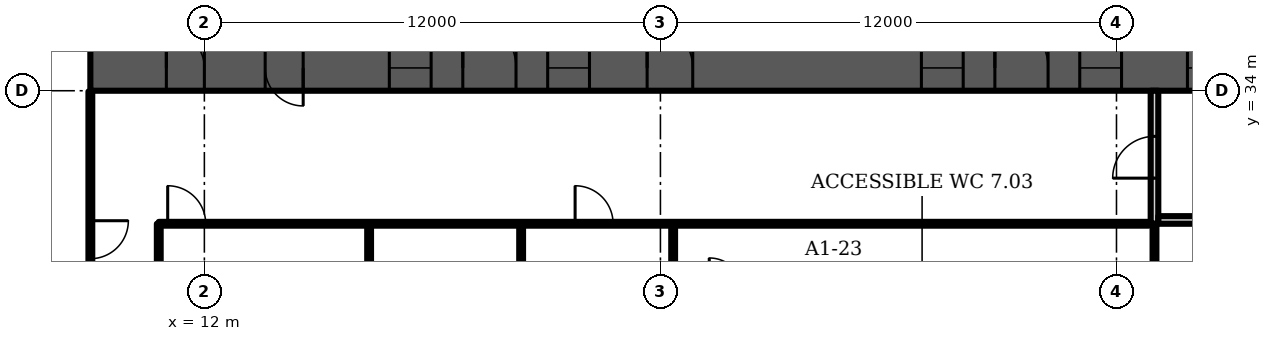
"""IFC4 building model, lengths in metres.
Left out: names, types, materials, properties, quantities, classifications, styles, units other than length and angle.
Written with IfcOpenShell. Run it as: python <this file> out.ifc"""

import sys

from ifc_helpers import new_model, si_unit, direction, frame, frame_2d, origin, place, context, subcontext, project, spatial, rectangle, extrude, element, fill, save


model = new_model("IFC4")
c1 = context("Model", 3, precision=1e-05, world=origin(), true_north=direction((0.0, 1.0)))
c2 = subcontext(c1, "Body", "Model", "MODEL_VIEW")
j1 = project(units=[si_unit("LENGTHUNIT", "METRE"), si_unit("PLANEANGLEUNIT", "RADIAN")], contexts=[c1])
p1 = place(None, origin())
s1 = spatial("IfcSite", under=j1, at=p1, CompositionType="ELEMENT")
p2 = place(p1, origin())
s2 = spatial("IfcBuilding", under=s1, at=p2, CompositionType="ELEMENT")
p3 = place(p2, frame((0.0, 0.0, 45.1)))
s3 = spatial("IfcBuildingStorey", under=s2, at=p3, CompositionType="ELEMENT", Elevation=45.1)
p4 = place(p3, frame((9.0, 34.6, 0.0), z_axis=(0.0, 0.0, 1.0), x_axis=(1.0, 0.0, 0.0)))
e1 = element("IfcWall", 1, at=p4, inside=s3, PredefinedType="SHEAR", context=c2, shape_type="SweptSolid", body=[
    extrude(rectangle(XDim=56.0, YDim=1.2, at=frame_2d((28.0, 0.0))), origin(), (0.0, 0.0, 1.0), 3.6),
])
p5 = place(p4, frame((2.0, 0.0, 0.0)))
e2 = element("IfcOpeningElement", 2, at=p5, cuts=e1, PredefinedType="OPENING", context=c2, shape_type="SweptSolid", body=[
    extrude(rectangle(XDim=1.0, YDim=2.1, at=frame_2d((0.5, 1.05))), frame((0.0, 0.61, 0.0), z_axis=(0.0, -1.0, 0.0), x_axis=(1.0, 0.0, 0.0)), (0.0, 0.0, 1.0), 1.22),
])
p6 = place(p4, frame((4.6, 0.0, 0.0)))
e3 = element("IfcOpeningElement", 3, at=p6, cuts=e1, PredefinedType="OPENING", context=c2, shape_type="SweptSolid", body=[
    extrude(rectangle(XDim=1.0, YDim=2.1, at=frame_2d((0.5, 1.05))), frame((0.0, 0.61, 0.0), z_axis=(0.0, -1.0, 0.0), x_axis=(1.0, 0.0, 0.0)), (0.0, 0.0, 1.0), 1.22),
])
p7 = place(p4, frame((7.867, 0.0, 0.0)))
e4 = element("IfcOpeningElement", 4, at=p7, cuts=e1, PredefinedType="OPENING", context=c2, shape_type="SweptSolid", body=[
    extrude(rectangle(XDim=1.1, YDim=2.1, at=frame_2d((0.55, 1.05))), frame((0.0, 0.61, 0.0), z_axis=(0.0, -1.0, 0.0), x_axis=(1.0, 0.0, 0.0)), (0.0, 0.0, 1.0), 1.22),
])
p8 = place(p4, frame((12.033, 0.0, 0.0)))
e5 = element("IfcOpeningElement", 5, at=p8, cuts=e1, PredefinedType="OPENING", context=c2, shape_type="SweptSolid", body=[
    extrude(rectangle(XDim=1.1, YDim=2.1, at=frame_2d((0.55, 1.05))), frame((0.0, 0.61, 0.0), z_axis=(0.0, -1.0, 0.0), x_axis=(1.0, 0.0, 0.0)), (0.0, 0.0, 1.0), 1.22),
])
p9 = place(p4, frame((9.8, 0.0, 0.0)))
e6 = element("IfcOpeningElement", 6, at=p9, cuts=e1, PredefinedType="OPENING", context=c2, shape_type="SweptSolid", body=[
    extrude(rectangle(XDim=1.4, YDim=2.1, at=frame_2d((0.7, 1.05))), frame((0.0, 0.61, 0.0), z_axis=(0.0, -1.0, 0.0), x_axis=(1.0, 0.0, 0.0)), (0.0, 0.0, 1.0), 1.22),
])
p10 = place(p4, frame((14.65, 0.0, 0.0)))
e7 = element("IfcOpeningElement", 7, at=p10, cuts=e1, PredefinedType="OPENING", context=c2, shape_type="SweptSolid", body=[
    extrude(rectangle(XDim=1.2, YDim=2.1, at=frame_2d((0.6, 1.05))), frame((0.0, 0.61, 0.0), z_axis=(0.0, -1.0, 0.0), x_axis=(1.0, 0.0, 0.0)), (0.0, 0.0, 1.0), 1.22),
])
p11 = place(p4, frame((21.867, 0.0, 0.0)))
e8 = element("IfcOpeningElement", 8, at=p11, cuts=e1, PredefinedType="OPENING", context=c2, shape_type="SweptSolid", body=[
    extrude(rectangle(XDim=1.1, YDim=2.1, at=frame_2d((0.55, 1.05))), frame((0.0, 0.61, 0.0), z_axis=(0.0, -1.0, 0.0), x_axis=(1.0, 0.0, 0.0)), (0.0, 0.0, 1.0), 1.22),
])
p12 = place(p4, frame((26.033, 0.0, 0.0)))
e9 = element("IfcOpeningElement", 9, at=p12, cuts=e1, PredefinedType="OPENING", context=c2, shape_type="SweptSolid", body=[
    extrude(rectangle(XDim=1.1, YDim=2.1, at=frame_2d((0.55, 1.05))), frame((0.0, 0.61, 0.0), z_axis=(0.0, -1.0, 0.0), x_axis=(1.0, 0.0, 0.0)), (0.0, 0.0, 1.0), 1.22),
])
p13 = place(p4, frame((23.8, 0.0, 0.0)))
e10 = element("IfcOpeningElement", 10, at=p13, cuts=e1, PredefinedType="OPENING", context=c2, shape_type="SweptSolid", body=[
    extrude(rectangle(XDim=1.4, YDim=2.1, at=frame_2d((0.7, 1.05))), frame((0.0, 0.61, 0.0), z_axis=(0.0, -1.0, 0.0), x_axis=(1.0, 0.0, 0.0)), (0.0, 0.0, 1.0), 1.22),
])
p14 = place(p4, frame((28.867, 0.0, 0.0)))
e11 = element("IfcOpeningElement", 11, at=p14, cuts=e1, PredefinedType="OPENING", context=c2, shape_type="SweptSolid", body=[
    extrude(rectangle(XDim=1.1, YDim=2.1, at=frame_2d((0.55, 1.05))), frame((0.0, 0.61, 0.0), z_axis=(0.0, -1.0, 0.0), x_axis=(1.0, 0.0, 0.0)), (0.0, 0.0, 1.0), 1.22),
])
p15 = place(p4, frame((33.033, 0.0, 0.0)))
e12 = element("IfcOpeningElement", 12, at=p15, cuts=e1, PredefinedType="OPENING", context=c2, shape_type="SweptSolid", body=[
    extrude(rectangle(XDim=1.1, YDim=2.1, at=frame_2d((0.55, 1.05))), frame((0.0, 0.61, 0.0), z_axis=(0.0, -1.0, 0.0), x_axis=(1.0, 0.0, 0.0)), (0.0, 0.0, 1.0), 1.22),
])
p16 = place(p4, frame((40.15, 0.0, 0.0)))
e13 = element("IfcOpeningElement", 13, at=p16, cuts=e1, PredefinedType="OPENING", context=c2, shape_type="SweptSolid", body=[
    extrude(rectangle(XDim=1.2, YDim=2.1, at=frame_2d((0.6, 1.05))), frame((0.0, 0.61, 0.0), z_axis=(0.0, -1.0, 0.0), x_axis=(1.0, 0.0, 0.0)), (0.0, 0.0, 1.0), 1.22),
])
p17 = place(p4, frame((44.8, 0.0, 0.0)))
e14 = element("IfcOpeningElement", 14, at=p17, cuts=e1, PredefinedType="OPENING", context=c2, shape_type="SweptSolid", body=[
    extrude(rectangle(XDim=1.4, YDim=2.1, at=frame_2d((0.7, 1.05))), frame((0.0, 0.61, 0.0), z_axis=(0.0, -1.0, 0.0), x_axis=(1.0, 0.0, 0.0)), (0.0, 0.0, 1.0), 1.22),
])
p18 = place(p4, frame((49.867, 0.0, 0.0)))
e15 = element("IfcOpeningElement", 15, at=p18, cuts=e1, PredefinedType="OPENING", context=c2, shape_type="SweptSolid", body=[
    extrude(rectangle(XDim=1.1, YDim=2.1, at=frame_2d((0.55, 1.05))), frame((0.0, 0.61, 0.0), z_axis=(0.0, -1.0, 0.0), x_axis=(1.0, 0.0, 0.0)), (0.0, 0.0, 1.0), 1.22),
])
p19 = place(p4, frame((53.5, 0.0, 0.0)))
e16 = element("IfcOpeningElement", 16, at=p19, cuts=e1, PredefinedType="OPENING", context=c2, shape_type="SweptSolid", body=[
    extrude(rectangle(XDim=1.1, YDim=2.1, at=frame_2d((0.55, 1.05))), frame((0.0, 0.61, 0.0), z_axis=(0.0, -1.0, 0.0), x_axis=(1.0, 0.0, 0.0)), (0.0, 0.0, 1.0), 1.22),
])
p20 = place(p4, frame((51.567, 0.0, 0.0)))
e17 = element("IfcOpeningElement", 17, at=p20, cuts=e1, PredefinedType="OPENING", context=c2, shape_type="SweptSolid", body=[
    extrude(rectangle(XDim=1.4, YDim=2.1, at=frame_2d((0.7, 1.05))), frame((0.0, 0.61, 0.0), z_axis=(0.0, -1.0, 0.0), x_axis=(1.0, 0.0, 0.0)), (0.0, 0.0, 1.0), 1.22),
])
p21 = place(p3, frame((37.0, 30.5, 0.0), z_axis=(0.0, 0.0, 1.0), x_axis=(0.0, 1.0, 0.0)))
e18 = element("IfcWall", 18, at=p21, inside=s3, PredefinedType="PARTITIONING", context=c2, shape_type="SweptSolid", body=[
    extrude(rectangle(XDim=3.5, YDim=0.2, at=frame_2d((1.75, 0.0))), origin(), (0.0, 0.0, 1.0), 3.2),
])
p22 = place(p21, frame((1.2, 0.0, 0.0)))
e19 = element("IfcOpeningElement", 19, at=p22, cuts=e18, PredefinedType="OPENING", context=c2, shape_type="SweptSolid", body=[
    extrude(rectangle(XDim=1.1, YDim=2.1, at=frame_2d((0.55, 1.05))), frame((0.0, 0.11, 0.0), z_axis=(0.0, -1.0, 0.0), x_axis=(1.0, 0.0, 0.0)), (0.0, 0.0, 1.0), 0.22),
])
p23 = place(p3, frame((37.1, 30.6, 0.0), z_axis=(0.0, 0.0, 1.0), x_axis=(1.0, 0.0, 0.0)))
e20 = element("IfcWall", 20, at=p23, inside=s3, PredefinedType="PARTITIONING", context=c2, shape_type="SweptSolid", body=[
    extrude(rectangle(XDim=2.8, YDim=0.2, at=frame_2d((1.4, 0.0))), origin(), (0.0, 0.0, 1.0), 3.2),
])
p24 = place(p3, frame((9.0, 26.02, 0.0), z_axis=(0.0, 0.0, 1.0), x_axis=(0.0, 1.0, 0.0)))
e21 = element("IfcWall", 21, at=p24, inside=s3, PredefinedType="PARTITIONING", context=c2, shape_type="SweptSolid", body=[
    extrude(rectangle(XDim=7.96, YDim=0.1, at=frame_2d((3.98, 0.0))), origin(), (0.0, 0.0, 1.0), 3.2),
])
p25 = place(p24, frame((3.56, 0.0, 0.0)))
e22 = element("IfcOpeningElement", 22, at=p25, cuts=e21, PredefinedType="OPENING", context=c2, shape_type="SweptSolid", body=[
    extrude(rectangle(XDim=1.0, YDim=2.1, at=frame_2d((0.5, 1.05))), frame((0.0, 0.06, 0.0), z_axis=(0.0, -1.0, 0.0), x_axis=(1.0, 0.0, 0.0)), (0.0, 0.0, 1.0), 0.12),
])
p26 = place(p3, frame((10.8, 23.55, 0.0), z_axis=(0.0, 0.0, 1.0), x_axis=(0.0, 1.0, 0.0)))
e23 = element("IfcWall", 23, at=p26, inside=s3, PredefinedType="PARTITIONING", context=c2, shape_type="SweptSolid", body=[
    extrude(rectangle(XDim=6.95, YDim=0.1, at=frame_2d((3.475, 0.0))), origin(), (0.0, 0.0, 1.0), 3.2),
])
p27 = place(p26, frame((0.308, 0.0, 0.0)))
e24 = element("IfcOpeningElement", 24, at=p27, cuts=e23, PredefinedType="OPENING", context=c2, shape_type="SweptSolid", body=[
    extrude(rectangle(XDim=1.0, YDim=2.1, at=frame_2d((0.5, 1.05))), frame((0.0, 0.06, 0.0), z_axis=(0.0, -1.0, 0.0), x_axis=(1.0, 0.0, 0.0)), (0.0, 0.0, 1.0), 0.12),
])
p28 = place(p3, frame((10.8, 30.5, 0.0), z_axis=(0.0, 0.0, 1.0), x_axis=(1.0, 0.0, 0.0)))
e25 = element("IfcWall", 25, at=p28, inside=s3, PredefinedType="PARTITIONING", context=c2, shape_type="SweptSolid", body=[
    extrude(rectangle(XDim=26.05, YDim=0.1, at=frame_2d((13.025, 0.0))), origin(), (0.0, 0.0, 1.0), 3.2),
])
p29 = place(p28, frame((0.235, 0.0, 0.0)))
e26 = element("IfcOpeningElement", 26, at=p29, cuts=e25, PredefinedType="OPENING", context=c2, shape_type="SweptSolid", body=[
    extrude(rectangle(XDim=1.0, YDim=2.1, at=frame_2d((0.5, 1.05))), frame((0.0, 0.06, 0.0), z_axis=(0.0, -1.0, 0.0), x_axis=(1.0, 0.0, 0.0)), (0.0, 0.0, 1.0), 0.12),
])
p30 = place(p28, frame((10.955, 0.0, 0.0)))
e27 = element("IfcOpeningElement", 27, at=p30, cuts=e25, PredefinedType="OPENING", context=c2, shape_type="SweptSolid", body=[
    extrude(rectangle(XDim=1.0, YDim=2.1, at=frame_2d((0.5, 1.05))), frame((0.0, 0.06, 0.0), z_axis=(0.0, -1.0, 0.0), x_axis=(1.0, 0.0, 0.0)), (0.0, 0.0, 1.0), 0.12),
])
for number, where, z_axis, x_axis in (
    (28, (16.335, 14.24, 0.0), (0.0, 0.0, 1.0), (0.0, 1.0, 0.0)),
    (29, (20.335, 14.24, 0.0), (0.0, 0.0, 1.0), (0.0, 1.0, 0.0)),
):
    element("IfcWall", number, at=place(p3, frame(where, z_axis=z_axis, x_axis=x_axis)), inside=s3, PredefinedType="PARTITIONING", context=c2, shape_type="SweptSolid", body=[
        extrude(rectangle(XDim=16.26, YDim=0.1, at=frame_2d((8.13, 0.0))), origin(), (0.0, 0.0, 1.0), 3.2),
    ])
p31 = place(p3, frame((24.335, 14.24, 0.0), z_axis=(0.0, 0.0, 1.0), x_axis=(0.0, 1.0, 0.0)))
e30 = element("IfcWall", 30, at=p31, inside=s3, PredefinedType="PARTITIONING", context=c2, shape_type="SweptSolid", body=[
    extrude(rectangle(XDim=16.25, YDim=0.1, at=frame_2d((8.125, 0.0))), origin(), (0.0, 0.0, 1.0), 3.2),
])
p32 = place(p3, frame((37.0, 14.24, 0.0), z_axis=(0.0, 0.0, 1.0), x_axis=(0.0, 1.0, 0.0)))
e31 = element("IfcWall", 31, at=p32, inside=s3, PredefinedType="PARTITIONING", context=c2, shape_type="SweptSolid", body=[
    extrude(rectangle(XDim=16.26, YDim=0.1, at=frame_2d((8.13, 0.0))), origin(), (0.0, 0.0, 1.0), 3.2),
])
p33 = place(p5, origin())
e32 = element("IfcDoor", 32, at=p33, inside=s3, OperationType="SINGLE_SWING_LEFT", PredefinedType="DOOR", context=c2, shape_type="SweptSolid", body=[
    extrude(rectangle(XDim=1.0, YDim=2.1, at=frame_2d((0.5, 1.05))), frame((0.0, 0.6, 0.0), z_axis=(0.0, -1.0, 0.0), x_axis=(1.0, 0.0, 0.0)), (0.0, 0.0, 1.0), 1.199),
])
fill(e2, e32)
p34 = place(p6, origin())
e33 = element("IfcDoor", 33, at=p34, inside=s3, OperationType="SINGLE_SWING_RIGHT", PredefinedType="DOOR", context=c2, shape_type="SweptSolid", body=[
    extrude(rectangle(XDim=1.0, YDim=2.1, at=frame_2d((0.5, 1.05))), frame((0.0, 0.6, 0.0), z_axis=(0.0, -1.0, 0.0), x_axis=(1.0, 0.0, 0.0)), (0.0, 0.0, 1.0), 1.199),
])
fill(e3, e33)
p35 = place(p7, origin())
e34 = element("IfcDoor", 34, at=p35, inside=s3, OperationType="DOUBLE_DOOR_SLIDING", PredefinedType="DOOR", context=c2, shape_type="SweptSolid", body=[
    extrude(rectangle(XDim=1.1, YDim=2.1, at=frame_2d((0.55, 1.05))), frame((0.0, 0.025, 0.0), z_axis=(0.0, -1.0, 0.0), x_axis=(1.0, 0.0, 0.0)), (0.0, 0.0, 1.0), 0.05),
])
fill(e4, e34)
p36 = place(p8, origin())
e35 = element("IfcDoor", 35, at=p36, inside=s3, OperationType="DOUBLE_DOOR_SLIDING", PredefinedType="DOOR", context=c2, shape_type="SweptSolid", body=[
    extrude(rectangle(XDim=1.1, YDim=2.1, at=frame_2d((0.55, 1.05))), frame((0.0, 0.025, 0.0), z_axis=(0.0, -1.0, 0.0), x_axis=(1.0, 0.0, 0.0)), (0.0, 0.0, 1.0), 0.05),
])
fill(e5, e35)
p37 = place(p9, origin())
e36 = element("IfcDoor", 36, at=p37, inside=s3, OperationType="DOUBLE_DOOR_SINGLE_SWING", PredefinedType="DOOR", context=c2, shape_type="SweptSolid", body=[
    extrude(rectangle(XDim=1.4, YDim=2.1, at=frame_2d((0.7, 1.05))), frame((0.0, 0.025, 0.0), z_axis=(0.0, -1.0, 0.0), x_axis=(1.0, 0.0, 0.0)), (0.0, 0.0, 1.0), 0.05),
])
fill(e6, e36)
p38 = place(p10, origin())
e37 = element("IfcDoor", 37, at=p38, inside=s3, OperationType="SINGLE_SWING_LEFT", PredefinedType="DOOR", context=c2, shape_type="SweptSolid", body=[
    extrude(rectangle(XDim=1.2, YDim=2.1, at=frame_2d((0.6, 1.05))), frame((0.0, 0.025, 0.0), z_axis=(0.0, -1.0, 0.0), x_axis=(1.0, 0.0, 0.0)), (0.0, 0.0, 1.0), 0.05),
])
fill(e7, e37)
p39 = place(p11, origin())
e38 = element("IfcDoor", 38, at=p39, inside=s3, OperationType="DOUBLE_DOOR_SLIDING", PredefinedType="DOOR", context=c2, shape_type="SweptSolid", body=[
    extrude(rectangle(XDim=1.1, YDim=2.1, at=frame_2d((0.55, 1.05))), frame((0.0, 0.025, 0.0), z_axis=(0.0, -1.0, 0.0), x_axis=(1.0, 0.0, 0.0)), (0.0, 0.0, 1.0), 0.05),
])
fill(e8, e38)
p40 = place(p12, origin())
e39 = element("IfcDoor", 39, at=p40, inside=s3, OperationType="DOUBLE_DOOR_SLIDING", PredefinedType="DOOR", context=c2, shape_type="SweptSolid", body=[
    extrude(rectangle(XDim=1.1, YDim=2.1, at=frame_2d((0.55, 1.05))), frame((0.0, 0.025, 0.0), z_axis=(0.0, -1.0, 0.0), x_axis=(1.0, 0.0, 0.0)), (0.0, 0.0, 1.0), 0.05),
])
fill(e9, e39)
p41 = place(p13, origin())
e40 = element("IfcDoor", 40, at=p41, inside=s3, OperationType="DOUBLE_DOOR_SINGLE_SWING", PredefinedType="DOOR", context=c2, shape_type="SweptSolid", body=[
    extrude(rectangle(XDim=1.4, YDim=2.1, at=frame_2d((0.7, 1.05))), frame((0.0, 0.025, 0.0), z_axis=(0.0, -1.0, 0.0), x_axis=(1.0, 0.0, 0.0)), (0.0, 0.0, 1.0), 0.05),
])
fill(e10, e40)
p42 = place(p14, origin())
e41 = element("IfcDoor", 41, at=p42, inside=s3, OperationType="DOUBLE_DOOR_SLIDING", PredefinedType="DOOR", context=c2, shape_type="SweptSolid", body=[
    extrude(rectangle(XDim=1.1, YDim=2.1, at=frame_2d((0.55, 1.05))), frame((0.0, 0.025, 0.0), z_axis=(0.0, -1.0, 0.0), x_axis=(1.0, 0.0, 0.0)), (0.0, 0.0, 1.0), 0.05),
])
fill(e11, e41)
p43 = place(p22, origin())
e42 = element("IfcDoor", 42, at=p43, inside=s3, OperationType="SINGLE_SWING_LEFT", PredefinedType="DOOR", context=c2, shape_type="SweptSolid", body=[
    extrude(rectangle(XDim=1.1, YDim=2.1, at=frame_2d((0.55, 1.05))), frame((0.0, 0.025, 0.0), z_axis=(0.0, -1.0, 0.0), x_axis=(1.0, 0.0, 0.0)), (0.0, 0.0, 1.0), 0.05),
])
fill(e19, e42)
p44 = place(p25, origin())
e43 = element("IfcDoor", 43, at=p44, inside=s3, OperationType="SINGLE_SWING_RIGHT", PredefinedType="DOOR", context=c2, shape_type="SweptSolid", body=[
    extrude(rectangle(XDim=1.0, YDim=2.1, at=frame_2d((0.5, 1.05))), frame((0.0, 0.025, 0.0), z_axis=(0.0, -1.0, 0.0), x_axis=(1.0, 0.0, 0.0)), (0.0, 0.0, 1.0), 0.05),
])
fill(e22, e43)
p45 = place(p29, origin())
e44 = element("IfcDoor", 44, at=p45, inside=s3, OperationType="SINGLE_SWING_LEFT", PredefinedType="DOOR", context=c2, shape_type="SweptSolid", body=[
    extrude(rectangle(XDim=1.0, YDim=2.1, at=frame_2d((0.5, 1.05))), frame((0.0, 0.025, 0.0), z_axis=(0.0, -1.0, 0.0), x_axis=(1.0, 0.0, 0.0)), (0.0, 0.0, 1.0), 0.05),
])
fill(e26, e44)
p46 = place(p30, origin())
e45 = element("IfcDoor", 45, at=p46, inside=s3, OperationType="SINGLE_SWING_LEFT", PredefinedType="DOOR", context=c2, shape_type="SweptSolid", body=[
    extrude(rectangle(XDim=1.0, YDim=2.1, at=frame_2d((0.5, 1.05))), frame((0.0, 0.025, 0.0), z_axis=(0.0, -1.0, 0.0), x_axis=(1.0, 0.0, 0.0)), (0.0, 0.0, 1.0), 0.05),
])
fill(e27, e45)
save(model, sys.argv[1])
